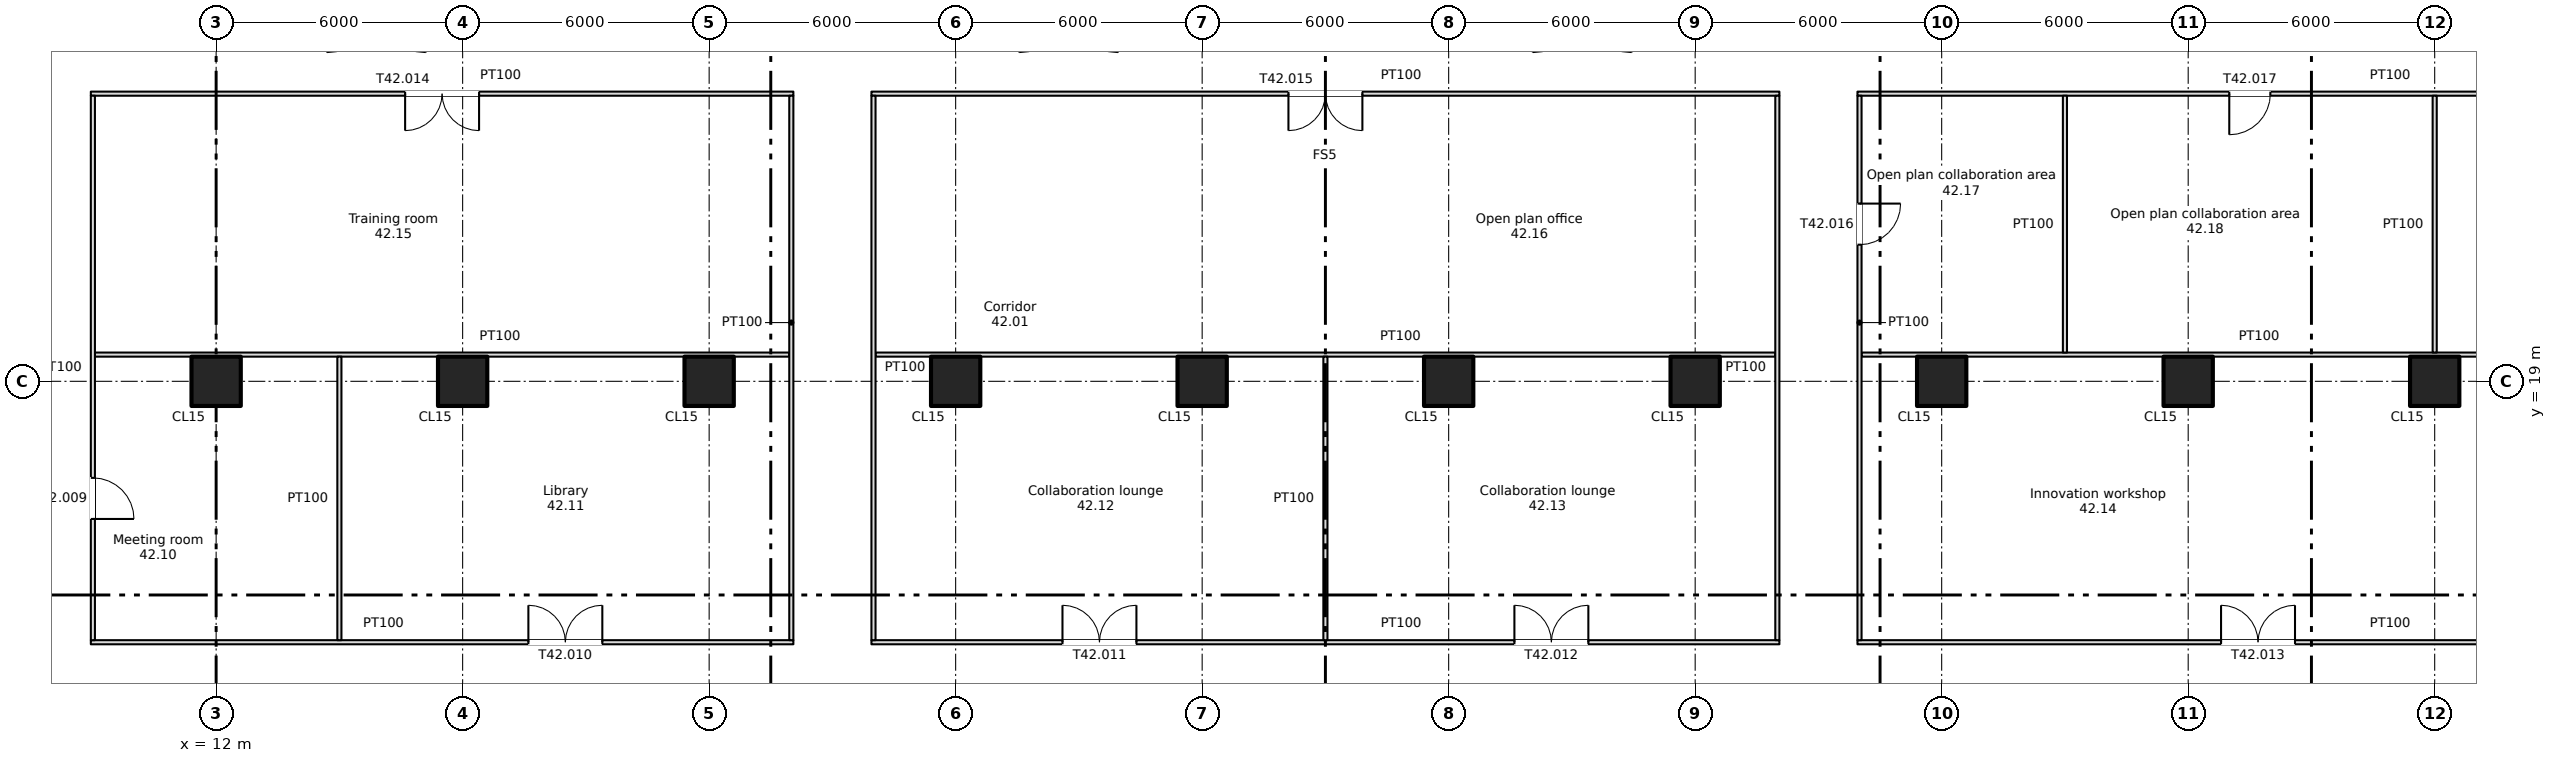
"""IFC4 building model, lengths in metres.
Left out: names, types, materials, properties, quantities, classifications, styles, units other than length and angle.
Written with IfcOpenShell. Run it as: python <this file> out.ifc"""

import sys

from ifc_helpers import new_model, si_unit, direction, frame, frame_2d, origin, origin_2d, place, context, subcontext, project, spatial, rectangle, extrude, element, fill, save


model = new_model("IFC4")
c1 = context("Model", 3, precision=1e-05, world=origin(), true_north=direction((0.0, 1.0)))
c2 = subcontext(c1, "Body", "Model", "MODEL_VIEW")
j1 = project(units=[si_unit("LENGTHUNIT", "METRE"), si_unit("PLANEANGLEUNIT", "RADIAN")], contexts=[c1])
p1 = place(None, origin())
s1 = spatial("IfcSite", under=j1, at=p1, CompositionType="ELEMENT")
p2 = place(p1, origin())
s2 = spatial("IfcBuilding", under=s1, at=p2, CompositionType="ELEMENT")
p3 = place(p2, frame((0.0, 0.0, 166.75)))
s3 = spatial("IfcBuildingStorey", under=s2, at=p3, CompositionType="ELEMENT", Elevation=166.75)
for number, where, z_axis, x_axis in (
    (1, (12.0, 19.0, 0.0), (0.0, 0.0, 1.0), (1.0, 0.0, 0.0)),
    (2, (18.0, 19.0, 0.0), (0.0, 0.0, 1.0), (1.0, 0.0, 0.0)),
    (3, (24.0, 19.0, 0.0), (0.0, 0.0, 1.0), (1.0, 0.0, 0.0)),
    (4, (30.0, 19.0, 0.0), (0.0, 0.0, 1.0), (1.0, 0.0, 0.0)),
    (5, (36.0, 19.0, 0.0), (0.0, 0.0, 1.0), (1.0, 0.0, 0.0)),
    (6, (42.0, 19.0, 0.0), (0.0, 0.0, 1.0), (1.0, 0.0, 0.0)),
    (7, (48.0, 19.0, 0.0), (0.0, 0.0, 1.0), (1.0, 0.0, 0.0)),
    (8, (54.0, 19.0, 0.0), (0.0, 0.0, 1.0), (1.0, 0.0, 0.0)),
    (9, (60.0, 19.0, 0.0), (0.0, 0.0, 1.0), (1.0, 0.0, 0.0)),
    (10, (66.0, 19.0, 0.0), (0.0, 0.0, 1.0), (1.0, 0.0, 0.0)),
):
    element("IfcColumn", number, at=place(p3, frame(where, z_axis=z_axis, x_axis=x_axis)), inside=s3, PredefinedType="COLUMN", context=c2, shape_type="SweptSolid", body=[
        extrude(rectangle(XDim=1.2, YDim=1.2, at=origin_2d()), origin(), (0.0, 0.0, 1.0), 3.35),
    ])
p4 = place(p3, frame((8.95, 12.65, 0.0), z_axis=(0.0, 0.0, 1.0), x_axis=(1.0, 0.0, 0.0)))
e11 = element("IfcWall", 11, at=p4, inside=s3, PredefinedType="PARTITIONING", context=c2, shape_type="SweptSolid", body=[
    extrude(rectangle(XDim=17.1, YDim=0.1, at=frame_2d((8.55, 0.0))), origin(), (0.0, 0.0, 1.0), 3.35),
])
p5 = place(p4, frame((10.65, 0.0, 0.0)))
e12 = element("IfcOpeningElement", 12, at=p5, cuts=e11, PredefinedType="OPENING", context=c2, shape_type="SweptSolid", body=[
    extrude(rectangle(XDim=1.8, YDim=2.1, at=frame_2d((0.9, 1.05))), frame((0.0, 0.06, 0.0), z_axis=(0.0, -1.0, 0.0), x_axis=(1.0, 0.0, 0.0)), (0.0, 0.0, 1.0), 0.12),
])
p6 = place(p3, frame((27.95, 12.65, 0.0), z_axis=(0.0, 0.0, 1.0), x_axis=(1.0, 0.0, 0.0)))
e13 = element("IfcWall", 13, at=p6, inside=s3, PredefinedType="PARTITIONING", context=c2, shape_type="SweptSolid", body=[
    extrude(rectangle(XDim=22.1, YDim=0.1, at=frame_2d((11.05, 0.0))), origin(), (0.0, 0.0, 1.0), 3.35),
])
p7 = place(p6, frame((4.65, 0.0, 0.0)))
e14 = element("IfcOpeningElement", 14, at=p7, cuts=e13, PredefinedType="OPENING", context=c2, shape_type="SweptSolid", body=[
    extrude(rectangle(XDim=1.8, YDim=2.1, at=frame_2d((0.9, 1.05))), frame((0.0, 0.06, 0.0), z_axis=(0.0, -1.0, 0.0), x_axis=(1.0, 0.0, 0.0)), (0.0, 0.0, 1.0), 0.12),
])
p8 = place(p6, frame((15.65, 0.0, 0.0)))
e15 = element("IfcOpeningElement", 15, at=p8, cuts=e13, PredefinedType="OPENING", context=c2, shape_type="SweptSolid", body=[
    extrude(rectangle(XDim=1.8, YDim=2.1, at=frame_2d((0.9, 1.05))), frame((0.0, 0.06, 0.0), z_axis=(0.0, -1.0, 0.0), x_axis=(1.0, 0.0, 0.0)), (0.0, 0.0, 1.0), 0.12),
])
p9 = place(p3, frame((51.95, 12.65, 0.0), z_axis=(0.0, 0.0, 1.0), x_axis=(1.0, 0.0, 0.0)))
e16 = element("IfcWall", 16, at=p9, inside=s3, PredefinedType="PARTITIONING", context=c2, shape_type="SweptSolid", body=[
    extrude(rectangle(XDim=19.45, YDim=0.1, at=frame_2d((9.725, 0.0))), origin(), (0.0, 0.0, 1.0), 3.35),
])
p10 = place(p9, frame((8.85, 0.0, 0.0)))
e17 = element("IfcOpeningElement", 17, at=p10, cuts=e16, PredefinedType="OPENING", context=c2, shape_type="SweptSolid", body=[
    extrude(rectangle(XDim=1.8, YDim=2.1, at=frame_2d((0.9, 1.05))), frame((0.0, 0.06, 0.0), z_axis=(0.0, -1.0, 0.0), x_axis=(1.0, 0.0, 0.0)), (0.0, 0.0, 1.0), 0.12),
])
p11 = place(p3, frame((9.05, 19.65, 0.0), z_axis=(0.0, 0.0, 1.0), x_axis=(1.0, 0.0, 0.0)))
e18 = element("IfcWall", 18, at=p11, inside=s3, PredefinedType="PARTITIONING", context=c2, shape_type="SweptSolid", body=[
    extrude(rectangle(XDim=16.9, YDim=0.1, at=frame_2d((8.45, 0.0))), origin(), (0.0, 0.0, 1.0), 3.35),
])
p12 = place(p3, frame((28.05, 19.65, 0.0), z_axis=(0.0, 0.0, 1.0), x_axis=(1.0, 0.0, 0.0)))
e19 = element("IfcWall", 19, at=p12, inside=s3, PredefinedType="PARTITIONING", context=c2, shape_type="SweptSolid", body=[
    extrude(rectangle(XDim=21.9, YDim=0.1, at=frame_2d((10.95, 0.0))), origin(), (0.0, 0.0, 1.0), 3.35),
])
p13 = place(p3, frame((52.05, 19.65, 0.0), z_axis=(0.0, 0.0, 1.0), x_axis=(1.0, 0.0, 0.0)))
e20 = element("IfcWall", 20, at=p13, inside=s3, PredefinedType="PARTITIONING", context=c2, shape_type="SweptSolid", body=[
    extrude(rectangle(XDim=19.35, YDim=0.1, at=frame_2d((9.675, 0.0))), origin(), (0.0, 0.0, 1.0), 3.35),
])
p14 = place(p3, frame((8.95, 26.0, 0.0), z_axis=(0.0, 0.0, 1.0), x_axis=(1.0, 0.0, 0.0)))
e21 = element("IfcWall", 21, at=p14, inside=s3, PredefinedType="PARTITIONING", context=c2, shape_type="SweptSolid", body=[
    extrude(rectangle(XDim=17.1, YDim=0.1, at=frame_2d((8.55, 0.0))), origin(), (0.0, 0.0, 1.0), 3.35),
])
p15 = place(p14, frame((7.65, 0.0, 0.0)))
e22 = element("IfcOpeningElement", 22, at=p15, cuts=e21, PredefinedType="OPENING", context=c2, shape_type="SweptSolid", body=[
    extrude(rectangle(XDim=1.8, YDim=2.1, at=frame_2d((0.9, 1.05))), frame((0.0, 0.06, 0.0), z_axis=(0.0, -1.0, 0.0), x_axis=(1.0, 0.0, 0.0)), (0.0, 0.0, 1.0), 0.12),
])
p16 = place(p3, frame((27.95, 26.0, 0.0), z_axis=(0.0, 0.0, 1.0), x_axis=(1.0, 0.0, 0.0)))
e23 = element("IfcWall", 23, at=p16, inside=s3, PredefinedType="PARTITIONING", context=c2, shape_type="SweptSolid", body=[
    extrude(rectangle(XDim=22.1, YDim=0.1, at=frame_2d((11.05, 0.0))), origin(), (0.0, 0.0, 1.0), 3.35),
])
p17 = place(p16, frame((10.15, 0.0, 0.0)))
e24 = element("IfcOpeningElement", 24, at=p17, cuts=e23, PredefinedType="OPENING", context=c2, shape_type="SweptSolid", body=[
    extrude(rectangle(XDim=1.8, YDim=2.1, at=frame_2d((0.9, 1.05))), frame((0.0, 0.06, 0.0), z_axis=(0.0, -1.0, 0.0), x_axis=(1.0, 0.0, 0.0)), (0.0, 0.0, 1.0), 0.12),
])
p18 = place(p3, frame((51.95, 26.0, 0.0), z_axis=(0.0, 0.0, 1.0), x_axis=(1.0, 0.0, 0.0)))
e25 = element("IfcWall", 25, at=p18, inside=s3, PredefinedType="PARTITIONING", context=c2, shape_type="SweptSolid", body=[
    extrude(rectangle(XDim=19.45, YDim=0.1, at=frame_2d((9.725, 0.0))), origin(), (0.0, 0.0, 1.0), 3.35),
])
p19 = place(p18, frame((9.05, 0.0, 0.0)))
e26 = element("IfcOpeningElement", 26, at=p19, cuts=e25, PredefinedType="OPENING", context=c2, shape_type="SweptSolid", body=[
    extrude(rectangle(XDim=1.0, YDim=2.1, at=frame_2d((0.5, 1.05))), frame((0.0, 0.06, 0.0), z_axis=(0.0, -1.0, 0.0), x_axis=(1.0, 0.0, 0.0)), (0.0, 0.0, 1.0), 0.12),
])
p20 = place(p18, frame((16.25, 0.0, 0.0)))
e27 = element("IfcOpeningElement", 27, at=p20, cuts=e25, PredefinedType="OPENING", context=c2, shape_type="SweptSolid", body=[
    extrude(rectangle(XDim=1.0, YDim=2.1, at=frame_2d((0.5, 1.05))), frame((0.0, 0.06, 0.0), z_axis=(0.0, -1.0, 0.0), x_axis=(1.0, 0.0, 0.0)), (0.0, 0.0, 1.0), 0.12),
])
p21 = place(p3, frame((9.0, 12.7, 0.0), z_axis=(0.0, 0.0, 1.0), x_axis=(0.0, 1.0, 0.0)))
e28 = element("IfcWall", 28, at=p21, inside=s3, PredefinedType="PARTITIONING", context=c2, shape_type="SweptSolid", body=[
    extrude(rectangle(XDim=13.25, YDim=0.1, at=frame_2d((6.625, 0.0))), origin(), (0.0, 0.0, 1.0), 3.35),
])
p22 = place(p21, frame((2.95, 0.0, 0.0)))
e29 = element("IfcOpeningElement", 29, at=p22, cuts=e28, PredefinedType="OPENING", context=c2, shape_type="SweptSolid", body=[
    extrude(rectangle(XDim=1.0, YDim=2.1, at=frame_2d((0.5, 1.05))), frame((0.0, 0.06, 0.0), z_axis=(0.0, -1.0, 0.0), x_axis=(1.0, 0.0, 0.0)), (0.0, 0.0, 1.0), 0.12),
])
p23 = place(p3, frame((15.0, 12.7, 0.0), z_axis=(0.0, 0.0, 1.0), x_axis=(0.0, 1.0, 0.0)))
e30 = element("IfcWall", 30, at=p23, inside=s3, PredefinedType="PARTITIONING", context=c2, shape_type="SweptSolid", body=[
    extrude(rectangle(XDim=6.9, YDim=0.1, at=frame_2d((3.45, 0.0))), origin(), (0.0, 0.0, 1.0), 3.35),
])
for number, where, z_axis, x_axis in (
    (31, (26.0, 12.7, 0.0), (0.0, 0.0, 1.0), (0.0, 1.0, 0.0)),
    (32, (28.0, 12.7, 0.0), (0.0, 0.0, 1.0), (0.0, 1.0, 0.0)),
):
    element("IfcWall", number, at=place(p3, frame(where, z_axis=z_axis, x_axis=x_axis)), inside=s3, PredefinedType="PARTITIONING", context=c2, shape_type="SweptSolid", body=[
        extrude(rectangle(XDim=13.25, YDim=0.1, at=frame_2d((6.625, 0.0))), origin(), (0.0, 0.0, 1.0), 3.35),
    ])
p24 = place(p3, frame((39.0, 12.7, 0.0), z_axis=(0.0, 0.0, 1.0), x_axis=(0.0, 1.0, 0.0)))
e33 = element("IfcWall", 33, at=p24, inside=s3, PredefinedType="PARTITIONING", context=c2, shape_type="SweptSolid", body=[
    extrude(rectangle(XDim=6.9, YDim=0.1, at=frame_2d((3.45, 0.0))), origin(), (0.0, 0.0, 1.0), 3.35),
])
p25 = place(p3, frame((50.0, 12.7, 0.0), z_axis=(0.0, 0.0, 1.0), x_axis=(0.0, 1.0, 0.0)))
e34 = element("IfcWall", 34, at=p25, inside=s3, PredefinedType="PARTITIONING", context=c2, shape_type="SweptSolid", body=[
    extrude(rectangle(XDim=13.25, YDim=0.1, at=frame_2d((6.625, 0.0))), origin(), (0.0, 0.0, 1.0), 3.35),
])
p26 = place(p3, frame((52.0, 12.7, 0.0), z_axis=(0.0, 0.0, 1.0), x_axis=(0.0, 1.0, 0.0)))
e35 = element("IfcWall", 35, at=p26, inside=s3, PredefinedType="PARTITIONING", context=c2, shape_type="SweptSolid", body=[
    extrude(rectangle(XDim=13.25, YDim=0.1, at=frame_2d((6.625, 0.0))), origin(), (0.0, 0.0, 1.0), 3.35),
])
p27 = place(p26, frame((9.625, 0.0, 0.0)))
e36 = element("IfcOpeningElement", 36, at=p27, cuts=e35, PredefinedType="OPENING", context=c2, shape_type="SweptSolid", body=[
    extrude(rectangle(XDim=1.0, YDim=2.1, at=frame_2d((0.5, 1.05))), frame((0.0, 0.06, 0.0), z_axis=(0.0, -1.0, 0.0), x_axis=(1.0, 0.0, 0.0)), (0.0, 0.0, 1.0), 0.12),
])
for number, where, z_axis, x_axis in (
    (37, (57.0, 19.7, 0.0), (0.0, 0.0, 1.0), (0.0, 1.0, 0.0)),
    (38, (66.0, 19.7, 0.0), (0.0, 0.0, 1.0), (0.0, 1.0, 0.0)),
):
    element("IfcWall", number, at=place(p3, frame(where, z_axis=z_axis, x_axis=x_axis)), inside=s3, PredefinedType="PARTITIONING", context=c2, shape_type="SweptSolid", body=[
        extrude(rectangle(XDim=6.25, YDim=0.1, at=frame_2d((3.125, 0.0))), origin(), (0.0, 0.0, 1.0), 3.35),
    ])
p28 = place(p22, origin())
e39 = element("IfcDoor", 39, at=p28, inside=s3, OperationType="SINGLE_SWING_LEFT", PredefinedType="DOOR", context=c2, shape_type="SweptSolid", body=[
    extrude(rectangle(XDim=1.0, YDim=2.1, at=frame_2d((0.5, 1.05))), frame((0.0, 0.025, 0.0), z_axis=(0.0, -1.0, 0.0), x_axis=(1.0, 0.0, 0.0)), (0.0, 0.0, 1.0), 0.05),
])
fill(e29, e39)
p29 = place(p5, origin())
e40 = element("IfcDoor", 40, at=p29, inside=s3, OperationType="DOUBLE_DOOR_SINGLE_SWING", PredefinedType="DOOR", context=c2, shape_type="SweptSolid", body=[
    extrude(rectangle(XDim=1.8, YDim=2.1, at=frame_2d((0.9, 1.05))), frame((0.0, 0.025, 0.0), z_axis=(0.0, -1.0, 0.0), x_axis=(1.0, 0.0, 0.0)), (0.0, 0.0, 1.0), 0.05),
])
fill(e12, e40)
p30 = place(p7, origin())
e41 = element("IfcDoor", 41, at=p30, inside=s3, OperationType="DOUBLE_DOOR_SINGLE_SWING", PredefinedType="DOOR", context=c2, shape_type="SweptSolid", body=[
    extrude(rectangle(XDim=1.8, YDim=2.1, at=frame_2d((0.9, 1.05))), frame((0.0, 0.025, 0.0), z_axis=(0.0, -1.0, 0.0), x_axis=(1.0, 0.0, 0.0)), (0.0, 0.0, 1.0), 0.05),
])
fill(e14, e41)
p31 = place(p8, origin())
e42 = element("IfcDoor", 42, at=p31, inside=s3, OperationType="DOUBLE_DOOR_SINGLE_SWING", PredefinedType="DOOR", context=c2, shape_type="SweptSolid", body=[
    extrude(rectangle(XDim=1.8, YDim=2.1, at=frame_2d((0.9, 1.05))), frame((0.0, 0.025, 0.0), z_axis=(0.0, -1.0, 0.0), x_axis=(1.0, 0.0, 0.0)), (0.0, 0.0, 1.0), 0.05),
])
fill(e15, e42)
p32 = place(p10, origin())
e43 = element("IfcDoor", 43, at=p32, inside=s3, OperationType="DOUBLE_DOOR_SINGLE_SWING", PredefinedType="DOOR", context=c2, shape_type="SweptSolid", body=[
    extrude(rectangle(XDim=1.8, YDim=2.1, at=frame_2d((0.9, 1.05))), frame((0.0, 0.025, 0.0), z_axis=(0.0, -1.0, 0.0), x_axis=(1.0, 0.0, 0.0)), (0.0, 0.0, 1.0), 0.05),
])
fill(e17, e43)
p33 = place(p15, origin())
e44 = element("IfcDoor", 44, at=p33, inside=s3, OperationType="DOUBLE_DOOR_SINGLE_SWING", PredefinedType="DOOR", context=c2, shape_type="SweptSolid", body=[
    extrude(rectangle(XDim=1.8, YDim=2.1, at=frame_2d((0.9, 1.05))), frame((0.0, 0.025, 0.0), z_axis=(0.0, -1.0, 0.0), x_axis=(1.0, 0.0, 0.0)), (0.0, 0.0, 1.0), 0.05),
])
fill(e22, e44)
p34 = place(p17, origin())
e45 = element("IfcDoor", 45, at=p34, inside=s3, OperationType="DOUBLE_DOOR_SINGLE_SWING", PredefinedType="DOOR", context=c2, shape_type="SweptSolid", body=[
    extrude(rectangle(XDim=1.8, YDim=2.1, at=frame_2d((0.9, 1.05))), frame((0.0, 0.025, 0.0), z_axis=(0.0, -1.0, 0.0), x_axis=(1.0, 0.0, 0.0)), (0.0, 0.0, 1.0), 0.05),
])
fill(e24, e45)
p35 = place(p27, origin())
e46 = element("IfcDoor", 46, at=p35, inside=s3, OperationType="SINGLE_SWING_RIGHT", PredefinedType="DOOR", context=c2, shape_type="SweptSolid", body=[
    extrude(rectangle(XDim=1.0, YDim=2.1, at=frame_2d((0.5, 1.05))), frame((0.0, 0.025, 0.0), z_axis=(0.0, -1.0, 0.0), x_axis=(1.0, 0.0, 0.0)), (0.0, 0.0, 1.0), 0.05),
])
fill(e36, e46)
p36 = place(p19, origin())
e47 = element("IfcDoor", 47, at=p36, inside=s3, OperationType="SINGLE_SWING_LEFT", PredefinedType="DOOR", context=c2, shape_type="SweptSolid", body=[
    extrude(rectangle(XDim=1.0, YDim=2.1, at=frame_2d((0.5, 1.05))), frame((0.0, 0.025, 0.0), z_axis=(0.0, -1.0, 0.0), x_axis=(1.0, 0.0, 0.0)), (0.0, 0.0, 1.0), 0.05),
])
fill(e26, e47)
save(model, sys.argv[1])
